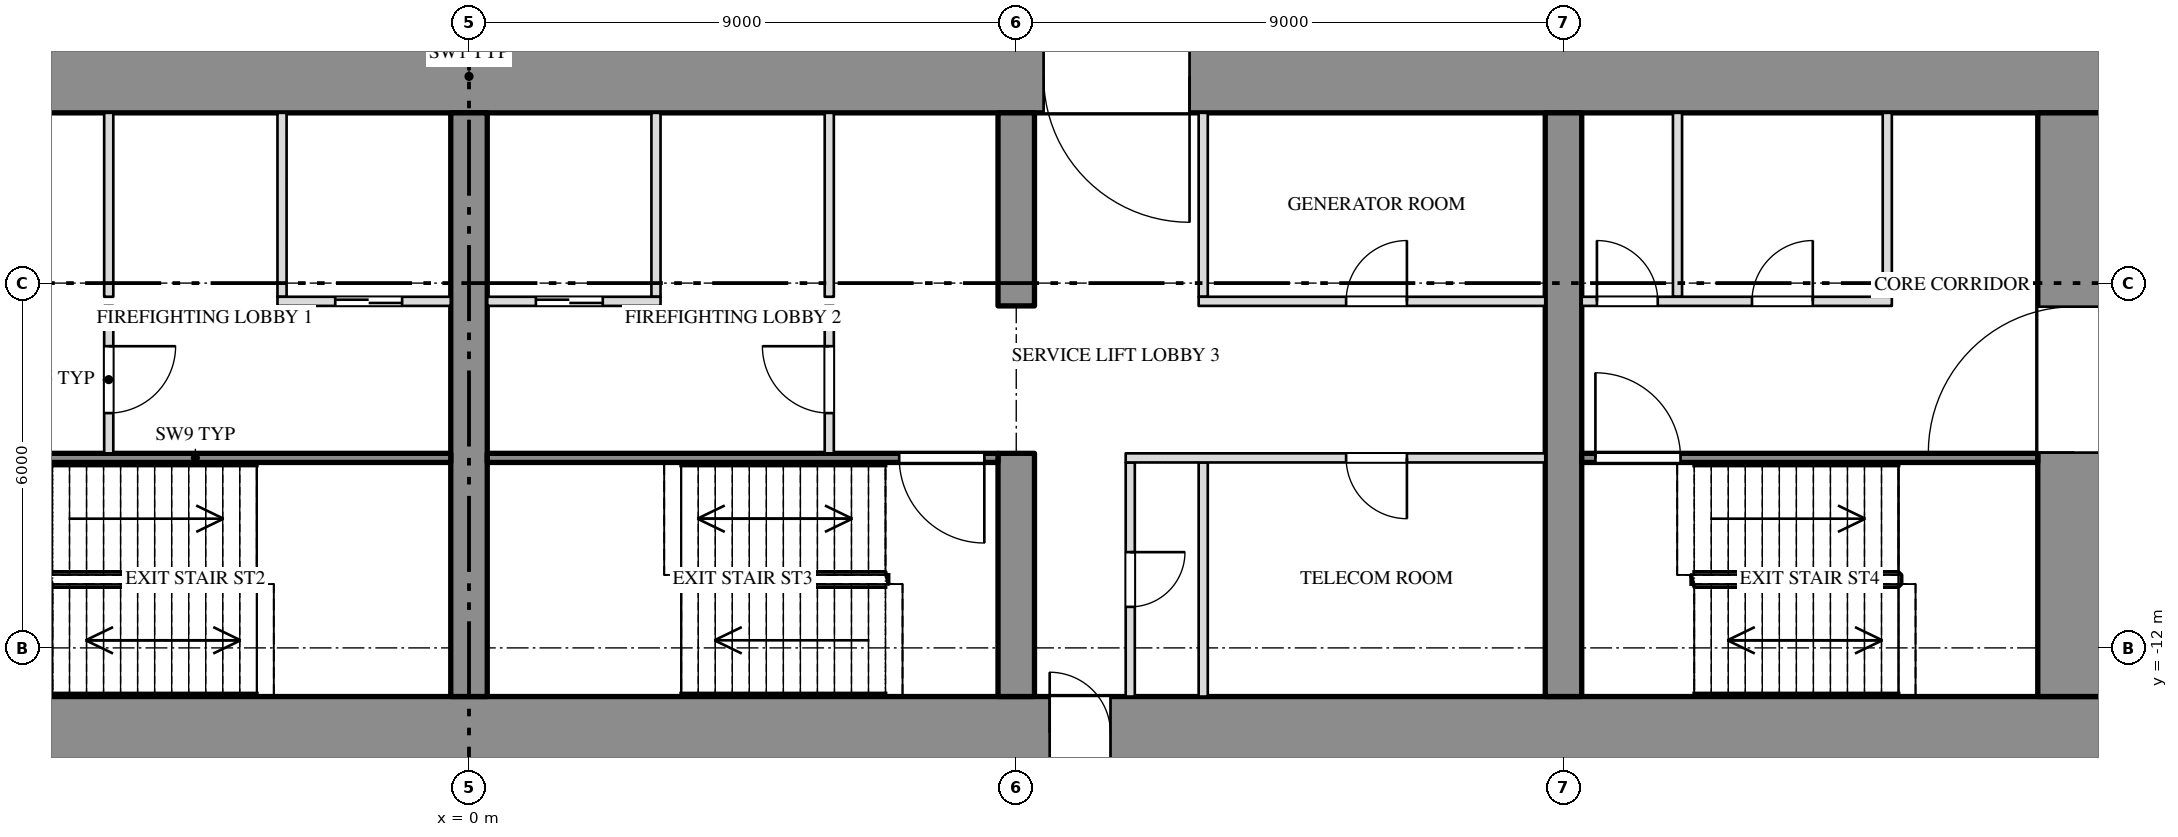
"""IFC4 building model, lengths in metres.
Left out: names, types, materials, properties, quantities, classifications, styles, units other than length and angle.
Written with IfcOpenShell. Run it as: python <this file> out.ifc"""

import sys

from ifc_helpers import new_model, si_unit, direction, frame, frame_2d, origin, place, context, subcontext, project, spatial, rectangle, extrude, element, fill, save


model = new_model("IFC4")
c1 = context("Model", 3, precision=1e-05, world=origin(), true_north=direction((0.0, 1.0)))
c2 = subcontext(c1, "Body", "Model", "MODEL_VIEW")
j1 = project(units=[si_unit("LENGTHUNIT", "METRE"), si_unit("PLANEANGLEUNIT", "RADIAN")], contexts=[c1])
p1 = place(None, origin())
s1 = spatial("IfcSite", under=j1, at=p1, CompositionType="ELEMENT")
p2 = place(p1, origin())
s2 = spatial("IfcBuilding", under=s1, at=p2, CompositionType="ELEMENT")
p3 = place(p2, frame((0.0, 0.0, -8.4)))
s3 = spatial("IfcBuildingStorey", under=s2, at=p3, CompositionType="ELEMENT", Elevation=-8.4)
p4 = place(p3, frame((-27.0, -2.6, 0.0), z_axis=(0.0, 0.0, 1.0), x_axis=(1.0, 0.0, 0.0)))
e1 = element("IfcWall", 1, at=p4, inside=s3, PredefinedType="SHEAR", context=c2, shape_type="SweptSolid", body=[
    extrude(rectangle(XDim=54.0, YDim=1.2, at=frame_2d((27.0, 0.0))), origin(), (0.0, 0.0, 1.0), 3.9),
])
p5 = place(p4, frame((15.15, 0.0, 0.0)))
e2 = element("IfcOpeningElement", 2, at=p5, cuts=e1, PredefinedType="OPENING", context=c2, shape_type="SweptSolid", body=[
    extrude(rectangle(XDim=2.4, YDim=2.1, at=frame_2d((1.2, 1.05))), frame((0.0, 0.612, 0.0), z_axis=(0.0, -1.0, 0.0), x_axis=(1.0, 0.0, 0.0)), (0.0, 0.0, 1.0), 1.224),
])
p6 = place(p4, frame((36.45, 0.0, 0.0)))
e3 = element("IfcOpeningElement", 3, at=p6, cuts=e1, PredefinedType="OPENING", context=c2, shape_type="SweptSolid", body=[
    extrude(rectangle(XDim=2.4, YDim=2.1, at=frame_2d((1.2, 1.05))), frame((0.0, 0.612, 0.0), z_axis=(0.0, -1.0, 0.0), x_axis=(1.0, 0.0, 0.0)), (0.0, 0.0, 1.0), 1.224),
])
p7 = place(p3, frame((-27.0, -13.4, 0.0), z_axis=(0.0, 0.0, 1.0), x_axis=(1.0, 0.0, 0.0)))
e4 = element("IfcWall", 4, at=p7, inside=s3, PredefinedType="SHEAR", context=c2, shape_type="SweptSolid", body=[
    extrude(rectangle(XDim=54.0, YDim=1.2, at=frame_2d((27.0, 0.0))), origin(), (0.0, 0.0, 1.0), 3.9),
])
p8 = place(p7, frame((16.45, 0.0, 0.0)))
e5 = element("IfcOpeningElement", 5, at=p8, cuts=e4, PredefinedType="OPENING", context=c2, shape_type="SweptSolid", body=[
    extrude(rectangle(XDim=1.0, YDim=2.1, at=frame_2d((0.5, 1.05))), frame((0.0, 0.612, 0.0), z_axis=(0.0, -1.0, 0.0), x_axis=(1.0, 0.0, 0.0)), (0.0, 0.0, 1.0), 1.224),
])
p9 = place(p7, frame((36.55, 0.0, 0.0)))
e6 = element("IfcOpeningElement", 6, at=p9, cuts=e4, PredefinedType="OPENING", context=c2, shape_type="SweptSolid", body=[
    extrude(rectangle(XDim=1.0, YDim=2.1, at=frame_2d((0.5, 1.05))), frame((0.0, 0.612, 0.0), z_axis=(0.0, -1.0, 0.0), x_axis=(1.0, 0.0, 0.0)), (0.0, 0.0, 1.0), 1.224),
])
p10 = place(p3, frame((26.4, -12.8, 0.0), z_axis=(0.0, 0.0, 1.0), x_axis=(0.0, 1.0, 0.0)))
e7 = element("IfcWall", 7, at=p10, inside=s3, PredefinedType="SHEAR", context=c2, shape_type="SweptSolid", body=[
    extrude(rectangle(XDim=9.6, YDim=1.2, at=frame_2d((4.8, 0.0))), origin(), (0.0, 0.0, 1.0), 3.9),
])
p11 = place(p10, frame((4.012, 0.0, 0.0)))
e8 = element("IfcOpeningElement", 8, at=p11, cuts=e7, PredefinedType="OPENING", context=c2, shape_type="SweptSolid", body=[
    extrude(rectangle(XDim=2.4, YDim=2.1, at=frame_2d((1.2, 1.05))), frame((0.0, 0.612, 0.0), z_axis=(0.0, -1.0, 0.0), x_axis=(1.0, 0.0, 0.0)), (0.0, 0.0, 1.0), 1.224),
])
p12 = place(p3, frame((0.0, -12.8, 0.0), z_axis=(0.0, 0.0, 1.0), x_axis=(0.0, 1.0, 0.0)))
e9 = element("IfcWall", 9, at=p12, inside=s3, PredefinedType="SHEAR", context=c2, shape_type="SweptSolid", body=[
    extrude(rectangle(XDim=9.6, YDim=0.6, at=frame_2d((4.8, 0.0))), origin(), (0.0, 0.0, 1.0), 3.9),
])
p13 = place(p3, frame((9.0, -12.8, 0.0), z_axis=(0.0, 0.0, 1.0), x_axis=(0.0, 1.0, 0.0)))
e10 = element("IfcWall", 10, at=p13, inside=s3, PredefinedType="SHEAR", context=c2, shape_type="SweptSolid", body=[
    extrude(rectangle(XDim=4.0, YDim=0.6, at=frame_2d((2.0, 0.0))), origin(), (0.0, 0.0, 1.0), 3.9),
])
p14 = place(p3, frame((9.0, -6.375, 0.0), z_axis=(0.0, 0.0, 1.0), x_axis=(0.0, 1.0, 0.0)))
e11 = element("IfcWall", 11, at=p14, inside=s3, PredefinedType="SHEAR", context=c2, shape_type="SweptSolid", body=[
    extrude(rectangle(XDim=3.175, YDim=0.6, at=frame_2d((1.587, 0.0))), origin(), (0.0, 0.0, 1.0), 3.9),
])
p15 = place(p3, frame((18.0, -12.8, 0.0), z_axis=(0.0, 0.0, 1.0), x_axis=(0.0, 1.0, 0.0)))
e12 = element("IfcWall", 12, at=p15, inside=s3, PredefinedType="SHEAR", context=c2, shape_type="SweptSolid", body=[
    extrude(rectangle(XDim=9.6, YDim=0.6, at=frame_2d((4.8, 0.0))), origin(), (0.0, 0.0, 1.0), 3.9),
])
for number, where, z_axis, x_axis in (
    (13, (-3.075, -6.225, 0.0), (0.0, 0.0, 1.0), (0.0, 1.0, 0.0)),
    (14, (-5.925, -6.225, 0.0), (0.0, 0.0, 1.0), (0.0, 1.0, 0.0)),
    (15, (3.075, -6.225, 0.0), (0.0, 0.0, 1.0), (0.0, 1.0, 0.0)),
    (16, (5.925, -6.225, 0.0), (0.0, 0.0, 1.0), (0.0, 1.0, 0.0)),
    (17, (12.075, -6.225, 0.0), (0.0, 0.0, 1.0), (0.0, 1.0, 0.0)),
    (18, (19.875, -6.225, 0.0), (0.0, 0.0, 1.0), (0.0, 1.0, 0.0)),
    (19, (23.325, -6.225, 0.0), (0.0, 0.0, 1.0), (0.0, 1.0, 0.0)),
):
    element("IfcWall", number, at=place(p3, frame(where, z_axis=z_axis, x_axis=x_axis)), inside=s3, PredefinedType="PARTITIONING", context=c2, shape_type="SweptSolid", body=[
        extrude(rectangle(XDim=3.025, YDim=0.15, at=frame_2d((1.513, 0.0))), origin(), (0.0, 0.0, 1.0), 3.9),
    ])
p16 = place(p3, frame((10.875, -12.8, 0.0), z_axis=(0.0, 0.0, 1.0), x_axis=(0.0, 1.0, 0.0)))
e20 = element("IfcWall", 20, at=p16, inside=s3, PredefinedType="PARTITIONING", context=c2, shape_type="SweptSolid", body=[
    extrude(rectangle(XDim=3.85, YDim=0.15, at=frame_2d((1.925, 0.0))), origin(), (0.0, 0.0, 1.0), 3.9),
])
p17 = place(p16, frame((1.475, 0.0, 0.0)))
e21 = element("IfcOpeningElement", 21, at=p17, cuts=e20, PredefinedType="OPENING", context=c2, shape_type="SweptSolid", body=[
    extrude(rectangle(XDim=0.9, YDim=2.1, at=frame_2d((0.45, 1.05))), frame((0.0, 0.087, 0.0), z_axis=(0.0, -1.0, 0.0), x_axis=(1.0, 0.0, 0.0)), (0.0, 0.0, 1.0), 0.174),
])
p18 = place(p3, frame((12.075, -12.8, 0.0), z_axis=(0.0, 0.0, 1.0), x_axis=(0.0, 1.0, 0.0)))
e22 = element("IfcWall", 22, at=p18, inside=s3, PredefinedType="PARTITIONING", context=c2, shape_type="SweptSolid", body=[
    extrude(rectangle(XDim=3.85, YDim=0.15, at=frame_2d((1.925, 0.0))), origin(), (0.0, 0.0, 1.0), 3.9),
])
p19 = place(p3, frame((-5.925, -8.8, 0.0), z_axis=(0.0, 0.0, 1.0), x_axis=(0.0, 1.0, 0.0)))
e23 = element("IfcWall", 23, at=p19, inside=s3, PredefinedType="PARTITIONING", context=c2, shape_type="SweptSolid", body=[
    extrude(rectangle(XDim=2.425, YDim=0.15, at=frame_2d((1.212, 0.0))), origin(), (0.0, 0.0, 1.0), 3.9),
])
p20 = place(p19, frame((0.662, 0.0, 0.0)))
e24 = element("IfcOpeningElement", 24, at=p20, cuts=e23, PredefinedType="OPENING", context=c2, shape_type="SweptSolid", body=[
    extrude(rectangle(XDim=1.1, YDim=2.1, at=frame_2d((0.55, 1.05))), frame((0.0, 0.087, 0.0), z_axis=(0.0, -1.0, 0.0), x_axis=(1.0, 0.0, 0.0)), (0.0, 0.0, 1.0), 0.174),
])
p21 = place(p3, frame((5.925, -8.8, 0.0), z_axis=(0.0, 0.0, 1.0), x_axis=(0.0, 1.0, 0.0)))
e25 = element("IfcWall", 25, at=p21, inside=s3, PredefinedType="PARTITIONING", context=c2, shape_type="SweptSolid", body=[
    extrude(rectangle(XDim=2.425, YDim=0.15, at=frame_2d((1.212, 0.0))), origin(), (0.0, 0.0, 1.0), 3.9),
])
p22 = place(p21, frame((0.662, 0.0, 0.0)))
e26 = element("IfcOpeningElement", 26, at=p22, cuts=e25, PredefinedType="OPENING", context=c2, shape_type="SweptSolid", body=[
    extrude(rectangle(XDim=1.1, YDim=2.1, at=frame_2d((0.55, 1.05))), frame((0.0, 0.087, 0.0), z_axis=(0.0, -1.0, 0.0), x_axis=(1.0, 0.0, 0.0)), (0.0, 0.0, 1.0), 0.174),
])
p23 = place(p3, frame((-3.15, -6.3, 0.0), z_axis=(0.0, 0.0, 1.0), x_axis=(1.0, 0.0, 0.0)))
e27 = element("IfcWall", 27, at=p23, inside=s3, PredefinedType="PARTITIONING", context=c2, shape_type="SweptSolid", body=[
    extrude(rectangle(XDim=2.85, YDim=0.15, at=frame_2d((1.425, 0.0))), origin(), (0.0, 0.0, 1.0), 3.9),
])
p24 = place(p23, frame((0.95, 0.0, 0.0)))
e28 = element("IfcOpeningElement", 28, at=p24, cuts=e27, PredefinedType="OPENING", context=c2, shape_type="SweptSolid", body=[
    extrude(rectangle(XDim=1.1, YDim=2.1, at=frame_2d((0.55, 1.05))), frame((0.0, 0.087, 0.0), z_axis=(0.0, -1.0, 0.0), x_axis=(1.0, 0.0, 0.0)), (0.0, 0.0, 1.0), 0.174),
])
p25 = place(p3, frame((0.3, -6.3, 0.0), z_axis=(0.0, 0.0, 1.0), x_axis=(1.0, 0.0, 0.0)))
e29 = element("IfcWall", 29, at=p25, inside=s3, PredefinedType="PARTITIONING", context=c2, shape_type="SweptSolid", body=[
    extrude(rectangle(XDim=2.85, YDim=0.15, at=frame_2d((1.425, 0.0))), origin(), (0.0, 0.0, 1.0), 3.9),
])
p26 = place(p25, frame((0.8, 0.0, 0.0)))
e30 = element("IfcOpeningElement", 30, at=p26, cuts=e29, PredefinedType="OPENING", context=c2, shape_type="SweptSolid", body=[
    extrude(rectangle(XDim=1.1, YDim=2.1, at=frame_2d((0.55, 1.05))), frame((0.0, 0.087, 0.0), z_axis=(0.0, -1.0, 0.0), x_axis=(1.0, 0.0, 0.0)), (0.0, 0.0, 1.0), 0.174),
])
p27 = place(p3, frame((12.0, -6.3, 0.0), z_axis=(0.0, 0.0, 1.0), x_axis=(1.0, 0.0, 0.0)))
e31 = element("IfcWall", 31, at=p27, inside=s3, PredefinedType="PARTITIONING", context=c2, shape_type="SweptSolid", body=[
    extrude(rectangle(XDim=5.7, YDim=0.15, at=frame_2d((2.85, 0.0))), origin(), (0.0, 0.0, 1.0), 3.9),
])
p28 = place(p27, frame((2.425, 0.0, 0.0)))
e32 = element("IfcOpeningElement", 32, at=p28, cuts=e31, PredefinedType="OPENING", context=c2, shape_type="SweptSolid", body=[
    extrude(rectangle(XDim=1.0, YDim=2.1, at=frame_2d((0.5, 1.05))), frame((0.0, 0.087, 0.0), z_axis=(0.0, -1.0, 0.0), x_axis=(1.0, 0.0, 0.0)), (0.0, 0.0, 1.0), 0.174),
])
p29 = place(p3, frame((18.3, -6.3, 0.0), z_axis=(0.0, 0.0, 1.0), x_axis=(1.0, 0.0, 0.0)))
e33 = element("IfcWall", 33, at=p29, inside=s3, PredefinedType="PARTITIONING", context=c2, shape_type="SweptSolid", body=[
    extrude(rectangle(XDim=5.1, YDim=0.15, at=frame_2d((2.55, 0.0))), origin(), (0.0, 0.0, 1.0), 3.9),
])
p30 = place(p29, frame((0.25, 0.0, 0.0)))
e34 = element("IfcOpeningElement", 34, at=p30, cuts=e33, PredefinedType="OPENING", context=c2, shape_type="SweptSolid", body=[
    extrude(rectangle(XDim=1.0, YDim=2.1, at=frame_2d((0.5, 1.05))), frame((0.0, 0.087, 0.0), z_axis=(0.0, -1.0, 0.0), x_axis=(1.0, 0.0, 0.0)), (0.0, 0.0, 1.0), 0.174),
])
p31 = place(p29, frame((2.8, 0.0, 0.0)))
e35 = element("IfcOpeningElement", 35, at=p31, cuts=e33, PredefinedType="OPENING", context=c2, shape_type="SweptSolid", body=[
    extrude(rectangle(XDim=1.0, YDim=2.1, at=frame_2d((0.5, 1.05))), frame((0.0, 0.087, 0.0), z_axis=(0.0, -1.0, 0.0), x_axis=(1.0, 0.0, 0.0)), (0.0, 0.0, 1.0), 0.174),
])
p32 = place(p3, frame((-8.7, -8.875, 0.0), z_axis=(0.0, 0.0, 1.0), x_axis=(1.0, 0.0, 0.0)))
e36 = element("IfcWall", 36, at=p32, inside=s3, PredefinedType="SHEAR", context=c2, shape_type="SweptSolid", body=[
    extrude(rectangle(XDim=8.4, YDim=0.15, at=frame_2d((4.2, 0.0))), origin(), (0.0, 0.0, 1.0), 3.9),
])
p33 = place(p32, frame((0.225, 0.0, 0.0)))
e37 = element("IfcOpeningElement", 37, at=p33, cuts=e36, PredefinedType="OPENING", context=c2, shape_type="SweptSolid", body=[
    extrude(rectangle(XDim=1.4, YDim=2.1, at=frame_2d((0.7, 1.05))), frame((0.0, 0.087, 0.0), z_axis=(0.0, -1.0, 0.0), x_axis=(1.0, 0.0, 0.0)), (0.0, 0.0, 1.0), 0.174),
])
p34 = place(p3, frame((0.3, -8.875, 0.0), z_axis=(0.0, 0.0, 1.0), x_axis=(1.0, 0.0, 0.0)))
e38 = element("IfcWall", 38, at=p34, inside=s3, PredefinedType="SHEAR", context=c2, shape_type="SweptSolid", body=[
    extrude(rectangle(XDim=8.4, YDim=0.15, at=frame_2d((4.2, 0.0))), origin(), (0.0, 0.0, 1.0), 3.9),
])
p35 = place(p34, frame((6.775, 0.0, 0.0)))
e39 = element("IfcOpeningElement", 39, at=p35, cuts=e38, PredefinedType="OPENING", context=c2, shape_type="SweptSolid", body=[
    extrude(rectangle(XDim=1.4, YDim=2.1, at=frame_2d((0.7, 1.05))), frame((0.0, 0.087, 0.0), z_axis=(0.0, -1.0, 0.0), x_axis=(1.0, 0.0, 0.0)), (0.0, 0.0, 1.0), 0.174),
])
p36 = place(p3, frame((10.8, -8.875, 0.0), z_axis=(0.0, 0.0, 1.0), x_axis=(1.0, 0.0, 0.0)))
e40 = element("IfcWall", 40, at=p36, inside=s3, PredefinedType="PARTITIONING", context=c2, shape_type="SweptSolid", body=[
    extrude(rectangle(XDim=6.9, YDim=0.15, at=frame_2d((3.45, 0.0))), origin(), (0.0, 0.0, 1.0), 3.9),
])
p37 = place(p36, frame((3.625, 0.0, 0.0)))
e41 = element("IfcOpeningElement", 41, at=p37, cuts=e40, PredefinedType="OPENING", context=c2, shape_type="SweptSolid", body=[
    extrude(rectangle(XDim=1.0, YDim=2.1, at=frame_2d((0.5, 1.05))), frame((0.0, 0.087, 0.0), z_axis=(0.0, -1.0, 0.0), x_axis=(1.0, 0.0, 0.0)), (0.0, 0.0, 1.0), 0.174),
])
p38 = place(p3, frame((18.3, -8.875, 0.0), z_axis=(0.0, 0.0, 1.0), x_axis=(1.0, 0.0, 0.0)))
e42 = element("IfcWall", 42, at=p38, inside=s3, PredefinedType="SHEAR", context=c2, shape_type="SweptSolid", body=[
    extrude(rectangle(XDim=7.5, YDim=0.15, at=frame_2d((3.75, 0.0))), origin(), (0.0, 0.0, 1.0), 3.9),
])
p39 = place(p38, frame((0.225, 0.0, 0.0)))
e43 = element("IfcOpeningElement", 43, at=p39, cuts=e42, PredefinedType="OPENING", context=c2, shape_type="SweptSolid", body=[
    extrude(rectangle(XDim=1.4, YDim=2.1, at=frame_2d((0.7, 1.05))), frame((0.0, 0.087, 0.0), z_axis=(0.0, -1.0, 0.0), x_axis=(1.0, 0.0, 0.0)), (0.0, 0.0, 1.0), 0.174),
])
p40 = place(p20, origin())
e44 = element("IfcDoor", 44, at=p40, inside=s3, OperationType="SINGLE_SWING_LEFT", PredefinedType="DOOR", context=c2, shape_type="SweptSolid", body=[
    extrude(rectangle(XDim=1.1, YDim=2.1, at=frame_2d((0.55, 1.05))), frame((0.0, 0.025, 0.0), z_axis=(0.0, -1.0, 0.0), x_axis=(1.0, 0.0, 0.0)), (0.0, 0.0, 1.0), 0.05),
])
fill(e24, e44)
p41 = place(p24, origin())
e45 = element("IfcDoor", 45, at=p41, inside=s3, OperationType="SLIDING_TO_RIGHT", PredefinedType="DOOR", context=c2, shape_type="SweptSolid", body=[
    extrude(rectangle(XDim=1.1, YDim=2.1, at=frame_2d((0.55, 1.05))), frame((0.0, 0.025, 0.0), z_axis=(0.0, -1.0, 0.0), x_axis=(1.0, 0.0, 0.0)), (0.0, 0.0, 1.0), 0.05),
])
fill(e28, e45)
p42 = place(p26, origin())
e46 = element("IfcDoor", 46, at=p42, inside=s3, OperationType="SLIDING_TO_LEFT", PredefinedType="DOOR", context=c2, shape_type="SweptSolid", body=[
    extrude(rectangle(XDim=1.1, YDim=2.1, at=frame_2d((0.55, 1.05))), frame((0.0, 0.025, 0.0), z_axis=(0.0, -1.0, 0.0), x_axis=(1.0, 0.0, 0.0)), (0.0, 0.0, 1.0), 0.05),
])
fill(e30, e46)
p43 = place(p22, origin())
e47 = element("IfcDoor", 47, at=p43, inside=s3, OperationType="SINGLE_SWING_RIGHT", PredefinedType="DOOR", context=c2, shape_type="SweptSolid", body=[
    extrude(rectangle(XDim=1.1, YDim=2.1, at=frame_2d((0.55, 1.05))), frame((0.0, 0.025, 0.0), z_axis=(0.0, -1.0, 0.0), x_axis=(1.0, 0.0, 0.0)), (0.0, 0.0, 1.0), 0.05),
])
fill(e26, e47)
p44 = place(p35, origin())
e48 = element("IfcDoor", 48, at=p44, inside=s3, OperationType="DOUBLE_DOOR_SINGLE_SWING", PredefinedType="DOOR", context=c2, shape_type="SweptSolid", body=[
    extrude(rectangle(XDim=1.4, YDim=2.1, at=frame_2d((0.7, 1.05))), frame((0.0, 0.025, 0.0), z_axis=(0.0, -1.0, 0.0), x_axis=(1.0, 0.0, 0.0)), (0.0, 0.0, 1.0), 0.05),
])
fill(e39, e48)
p45 = place(p9, origin())
e49 = element("IfcDoor", 49, at=p45, inside=s3, OperationType="SINGLE_SWING_LEFT", PredefinedType="DOOR", context=c2, shape_type="SweptSolid", body=[
    extrude(rectangle(XDim=1.0, YDim=2.1, at=frame_2d((0.5, 1.05))), frame((0.0, 0.025, 0.0), z_axis=(0.0, -1.0, 0.0), x_axis=(1.0, 0.0, 0.0)), (0.0, 0.0, 1.0), 0.05),
])
fill(e6, e49)
p46 = place(p6, origin())
e50 = element("IfcDoor", 50, at=p46, inside=s3, OperationType="DOUBLE_DOOR_SINGLE_SWING", PredefinedType="DOOR", context=c2, shape_type="SweptSolid", body=[
    extrude(rectangle(XDim=2.4, YDim=2.1, at=frame_2d((1.2, 1.05))), frame((0.0, 0.025, 0.0), z_axis=(0.0, -1.0, 0.0), x_axis=(1.0, 0.0, 0.0)), (0.0, 0.0, 1.0), 0.05),
])
fill(e3, e50)
p47 = place(p17, origin())
e51 = element("IfcDoor", 51, at=p47, inside=s3, OperationType="SINGLE_SWING_LEFT", PredefinedType="DOOR", context=c2, shape_type="SweptSolid", body=[
    extrude(rectangle(XDim=0.9, YDim=2.1, at=frame_2d((0.45, 1.05))), frame((0.0, 0.025, 0.0), z_axis=(0.0, -1.0, 0.0), x_axis=(1.0, 0.0, 0.0)), (0.0, 0.0, 1.0), 0.05),
])
fill(e21, e51)
p48 = place(p37, origin())
e52 = element("IfcDoor", 52, at=p48, inside=s3, OperationType="SINGLE_SWING_LEFT", PredefinedType="DOOR", context=c2, shape_type="SweptSolid", body=[
    extrude(rectangle(XDim=1.0, YDim=2.1, at=frame_2d((0.5, 1.05))), frame((0.0, 0.025, 0.0), z_axis=(0.0, -1.0, 0.0), x_axis=(1.0, 0.0, 0.0)), (0.0, 0.0, 1.0), 0.05),
])
fill(e41, e52)
p49 = place(p28, origin())
e53 = element("IfcDoor", 53, at=p49, inside=s3, OperationType="SINGLE_SWING_RIGHT", PredefinedType="DOOR", context=c2, shape_type="SweptSolid", body=[
    extrude(rectangle(XDim=1.0, YDim=2.1, at=frame_2d((0.5, 1.05))), frame((0.0, 0.025, 0.0), z_axis=(0.0, -1.0, 0.0), x_axis=(1.0, 0.0, 0.0)), (0.0, 0.0, 1.0), 0.05),
])
fill(e32, e53)
p50 = place(p30, origin())
e54 = element("IfcDoor", 54, at=p50, inside=s3, OperationType="SINGLE_SWING_LEFT", PredefinedType="DOOR", context=c2, shape_type="SweptSolid", body=[
    extrude(rectangle(XDim=1.0, YDim=2.1, at=frame_2d((0.5, 1.05))), frame((0.0, 0.025, 0.0), z_axis=(0.0, -1.0, 0.0), x_axis=(1.0, 0.0, 0.0)), (0.0, 0.0, 1.0), 0.05),
])
fill(e34, e54)
p51 = place(p39, origin())
e55 = element("IfcDoor", 55, at=p51, inside=s3, OperationType="DOUBLE_DOOR_SINGLE_SWING", PredefinedType="DOOR", context=c2, shape_type="SweptSolid", body=[
    extrude(rectangle(XDim=1.4, YDim=2.1, at=frame_2d((0.7, 1.05))), frame((0.0, 0.025, 0.0), z_axis=(0.0, -1.0, 0.0), x_axis=(1.0, 0.0, 0.0)), (0.0, 0.0, 1.0), 0.05),
])
fill(e43, e55)
p52 = place(p31, origin())
e56 = element("IfcDoor", 56, at=p52, inside=s3, OperationType="SINGLE_SWING_RIGHT", PredefinedType="DOOR", context=c2, shape_type="SweptSolid", body=[
    extrude(rectangle(XDim=1.0, YDim=2.1, at=frame_2d((0.5, 1.05))), frame((0.0, 0.025, 0.0), z_axis=(0.0, -1.0, 0.0), x_axis=(1.0, 0.0, 0.0)), (0.0, 0.0, 1.0), 0.05),
])
fill(e35, e56)
p53 = place(p11, origin())
e57 = element("IfcDoor", 57, at=p53, inside=s3, OperationType="DOUBLE_DOOR_SINGLE_SWING", PredefinedType="DOOR", context=c2, shape_type="SweptSolid", body=[
    extrude(rectangle(XDim=2.4, YDim=2.1, at=frame_2d((1.2, 1.05))), frame((0.0, 0.025, 0.0), z_axis=(0.0, -1.0, 0.0), x_axis=(1.0, 0.0, 0.0)), (0.0, 0.0, 1.0), 0.05),
])
fill(e8, e57)
save(model, sys.argv[1])
